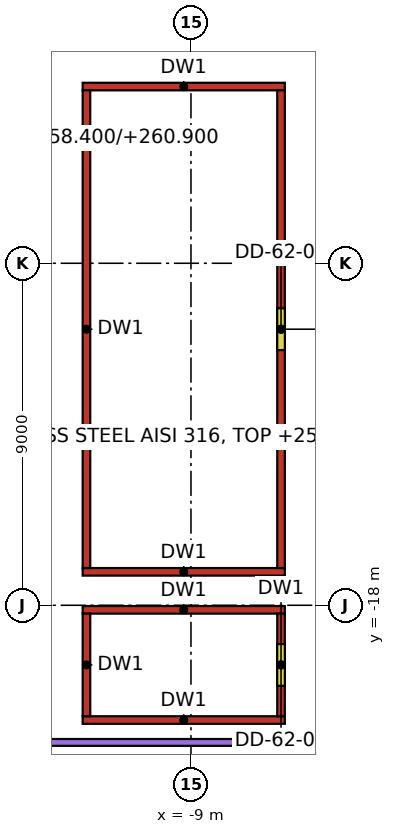
"""IFC4 building model, lengths in metres.
Left out: names, types, materials, properties, quantities, classifications, styles, units other than length and angle.
Written with IfcOpenShell. Run it as: python <this file> out.ifc"""

import sys

from ifc_helpers import new_model, si_unit, direction, frame, frame_2d, origin, place, context, subcontext, project, spatial, rectangle, extrude, element, fill, save


model = new_model("IFC4")
c1 = context("Model", 3, precision=1e-05, world=origin(), true_north=direction((0.0, 1.0)))
c2 = subcontext(c1, "Body", "Model", "MODEL_VIEW")
j1 = project(units=[si_unit("LENGTHUNIT", "METRE"), si_unit("PLANEANGLEUNIT", "RADIAN")], contexts=[c1])
p1 = place(None, origin())
s1 = spatial("IfcSite", under=j1, at=p1, CompositionType="ELEMENT")
p2 = place(p1, origin())
s2 = spatial("IfcBuilding", under=s1, at=p2, CompositionType="ELEMENT")
p3 = place(p2, frame((0.0, 0.0, 258.4)))
s3 = spatial("IfcBuildingStorey", under=s2, at=p3, CompositionType="ELEMENT", Elevation=258.4)
for number, where, z_axis, x_axis in (
    (1, (-11.85, -21.02, 0.0), (0.0, 0.0, 1.0), (1.0, 0.0, 0.0)),
    (2, (-11.85, -18.12, 0.0), (0.0, 0.0, 1.0), (1.0, 0.0, 0.0)),
):
    element("IfcWall", number, at=place(p3, frame(where, z_axis=z_axis, x_axis=x_axis)), inside=s3, PredefinedType="PARTITIONING", context=c2, shape_type="SweptSolid", body=[
        extrude(rectangle(XDim=5.32, YDim=0.2, at=frame_2d((2.66, 0.0))), origin(), (0.0, 0.0, 1.0), 3.3),
    ])
p4 = place(p3, frame((-11.75, -20.92, 0.0), z_axis=(0.0, 0.0, 1.0), x_axis=(0.0, 1.0, 0.0)))
e3 = element("IfcWall", 3, at=p4, inside=s3, PredefinedType="PARTITIONING", context=c2, shape_type="SweptSolid", body=[
    extrude(rectangle(XDim=2.7, YDim=0.2, at=frame_2d((1.35, 0.0))), origin(), (0.0, 0.0, 1.0), 3.3),
])
p5 = place(p3, frame((-6.63, -20.92, 0.0), z_axis=(0.0, 0.0, 1.0), x_axis=(0.0, 1.0, 0.0)))
e4 = element("IfcWall", 4, at=p5, inside=s3, PredefinedType="PARTITIONING", context=c2, shape_type="SweptSolid", body=[
    extrude(rectangle(XDim=2.7, YDim=0.2, at=frame_2d((1.35, 0.0))), origin(), (0.0, 0.0, 1.0), 3.3),
])
p6 = place(p5, frame((0.8, 0.0, 0.0)))
e5 = element("IfcOpeningElement", 5, at=p6, cuts=e4, PredefinedType="OPENING", context=c2, shape_type="SweptSolid", body=[
    extrude(rectangle(XDim=1.1, YDim=2.1, at=frame_2d((0.55, 1.05))), frame((0.0, 0.1, 0.0), z_axis=(0.0, -1.0, 0.0), x_axis=(1.0, 0.0, 0.0)), (0.0, 0.0, 1.0), 0.2),
])
for number, where, z_axis, x_axis in (
    (6, (-11.85, -17.12, 0.0), (0.0, 0.0, 1.0), (1.0, 0.0, 0.0)),
    (7, (-11.85, -4.35, 0.0), (0.0, 0.0, 1.0), (1.0, 0.0, 0.0)),
):
    element("IfcWall", number, at=place(p3, frame(where, z_axis=z_axis, x_axis=x_axis)), inside=s3, PredefinedType="PARTITIONING", context=c2, shape_type="SweptSolid", body=[
        extrude(rectangle(XDim=5.32, YDim=0.2, at=frame_2d((2.66, 0.0))), origin(), (0.0, 0.0, 1.0), 3.3),
    ])
p7 = place(p3, frame((-11.75, -17.02, 0.0), z_axis=(0.0, 0.0, 1.0), x_axis=(0.0, 1.0, 0.0)))
e8 = element("IfcWall", 8, at=p7, inside=s3, PredefinedType="PARTITIONING", context=c2, shape_type="SweptSolid", body=[
    extrude(rectangle(XDim=12.57, YDim=0.2, at=frame_2d((6.285, 0.0))), origin(), (0.0, 0.0, 1.0), 3.3),
])
p8 = place(p3, frame((-6.63, -17.02, 0.0), z_axis=(0.0, 0.0, 1.0), x_axis=(0.0, 1.0, 0.0)))
e9 = element("IfcWall", 9, at=p8, inside=s3, PredefinedType="PARTITIONING", context=c2, shape_type="SweptSolid", body=[
    extrude(rectangle(XDim=12.57, YDim=0.2, at=frame_2d((6.285, 0.0))), origin(), (0.0, 0.0, 1.0), 3.3),
])
p9 = place(p8, frame((5.735, 0.0, 0.0)))
e10 = element("IfcOpeningElement", 10, at=p9, cuts=e9, PredefinedType="OPENING", context=c2, shape_type="SweptSolid", body=[
    extrude(rectangle(XDim=1.1, YDim=2.1, at=frame_2d((0.55, 1.05))), frame((0.0, 0.1, 0.0), z_axis=(0.0, -1.0, 0.0), x_axis=(1.0, 0.0, 0.0)), (0.0, 0.0, 1.0), 0.2),
])
p10 = place(p6, origin())
e11 = element("IfcDoor", 11, at=p10, inside=s3, OperationType="SINGLE_SWING_LEFT", PredefinedType="DOOR", context=c2, shape_type="SweptSolid", body=[
    extrude(rectangle(XDim=1.1, YDim=2.1, at=frame_2d((0.55, 1.05))), frame((0.0, 0.025, 0.0), z_axis=(0.0, -1.0, 0.0), x_axis=(1.0, 0.0, 0.0)), (0.0, 0.0, 1.0), 0.05),
])
fill(e5, e11)
p11 = place(p9, origin())
e12 = element("IfcDoor", 12, at=p11, inside=s3, OperationType="SINGLE_SWING_LEFT", PredefinedType="DOOR", context=c2, shape_type="SweptSolid", body=[
    extrude(rectangle(XDim=1.1, YDim=2.1, at=frame_2d((0.55, 1.05))), frame((0.0, 0.025, 0.0), z_axis=(0.0, -1.0, 0.0), x_axis=(1.0, 0.0, 0.0)), (0.0, 0.0, 1.0), 0.05),
])
fill(e10, e12)
save(model, sys.argv[1])
